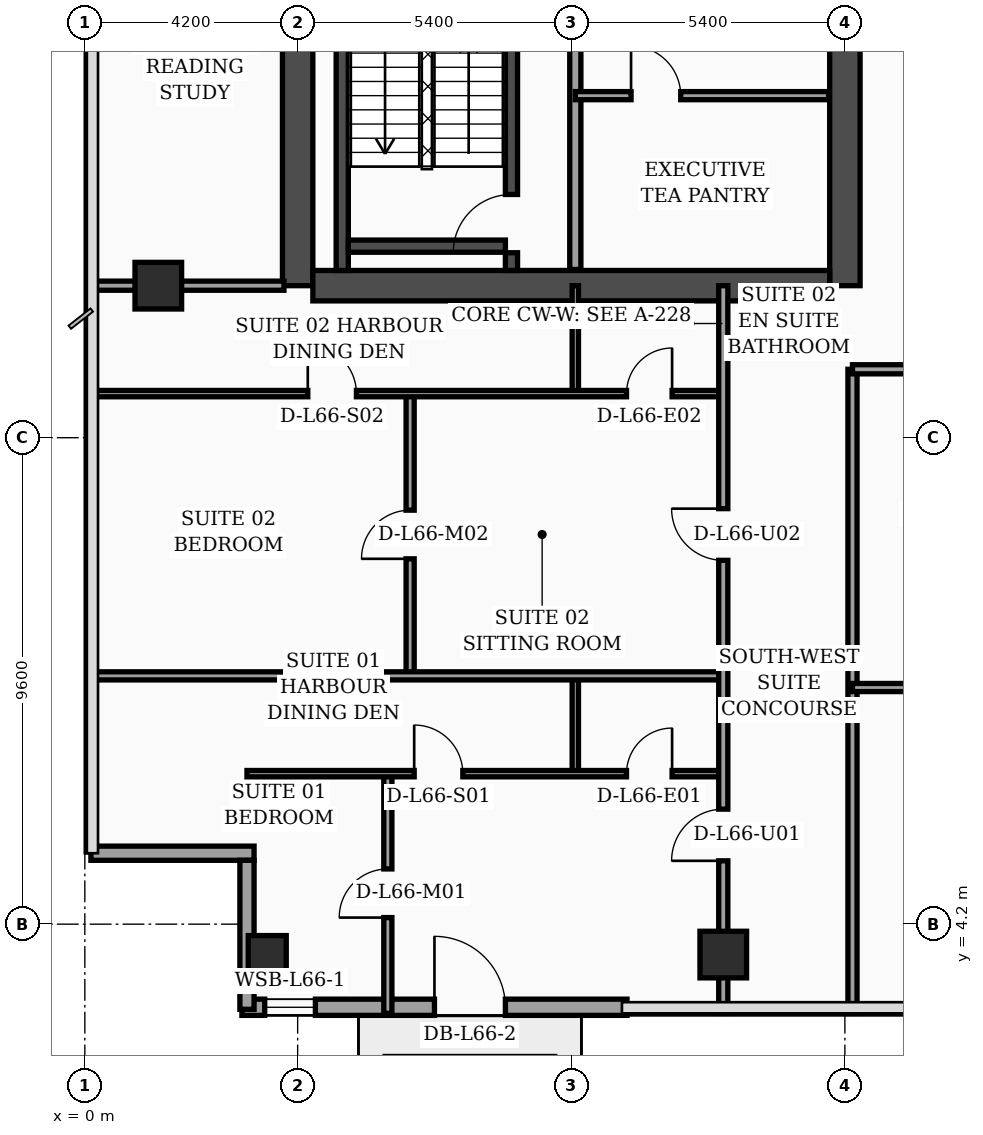
"""IFC4 building model, lengths in metres.
Left out: names, types, materials, properties, quantities, classifications, styles, units other than length and angle.
Written with IfcOpenShell. Run it as: python <this file> out.ifc"""

import sys

from ifc_helpers import new_model, si_unit, direction, frame, frame_2d, origin, origin_2d, place, context, subcontext, project, spatial, rectangle, hollow_rectangle, extrude, element, fill, save


model = new_model("IFC4")
c1 = context("Model", 3, precision=1e-05, world=origin(), true_north=direction((0.0, 1.0)))
c2 = subcontext(c1, "Body", "Model", "MODEL_VIEW")
j1 = project(units=[si_unit("LENGTHUNIT", "METRE"), si_unit("PLANEANGLEUNIT", "RADIAN")], contexts=[c1])
p1 = place(None, origin())
s1 = spatial("IfcSite", under=j1, at=p1, CompositionType="ELEMENT")
p2 = place(p1, origin())
s2 = spatial("IfcBuilding", under=s1, at=p2, CompositionType="ELEMENT")
p3 = place(p2, frame((0.0, 0.0, 267.3)))
s3 = spatial("IfcBuildingStorey", under=s2, at=p3, CompositionType="ELEMENT", Elevation=267.3)
p4 = place(p3, frame((4.2, 16.8, 0.0), z_axis=(0.0, 0.0, 1.0), x_axis=(0.0, 1.0, 0.0)))
e1 = element("IfcWall", 1, at=p4, inside=s3, PredefinedType="SHEAR", context=c2, shape_type="SweptSolid", body=[
    extrude(rectangle(XDim=21.6, YDim=0.6, at=frame_2d((10.8, 0.0))), origin(), (0.0, 0.0, 1.0), 3.56),
])
p5 = place(p3, frame((15.0, 16.8, 0.0), z_axis=(0.0, 0.0, 1.0), x_axis=(0.0, 1.0, 0.0)))
e2 = element("IfcWall", 2, at=p5, inside=s3, PredefinedType="SHEAR", context=c2, shape_type="SweptSolid", body=[
    extrude(rectangle(XDim=21.6, YDim=0.6, at=frame_2d((10.8, 0.0))), origin(), (0.0, 0.0, 1.0), 3.56),
])
p6 = place(p5, frame((8.65, 0.0, 0.0)))
e3 = element("IfcOpeningElement", 3, at=p6, cuts=e2, PredefinedType="OPENING", context=c2, shape_type="SweptSolid", body=[
    extrude(rectangle(XDim=1.1, YDim=2.2, at=frame_2d((0.55, 1.1))), frame((0.0, 0.31, 0.0), z_axis=(0.0, -1.0, 0.0), x_axis=(1.0, 0.0, 0.0)), (0.0, 0.0, 1.0), 0.62),
])
p7 = place(p5, frame((18.9, 0.0, 0.0)))
e4 = element("IfcOpeningElement", 4, at=p7, cuts=e2, PredefinedType="OPENING", context=c2, shape_type="SweptSolid", body=[
    extrude(rectangle(XDim=1.1, YDim=2.2, at=frame_2d((0.55, 1.1))), frame((0.0, 0.31, 0.0), z_axis=(0.0, -1.0, 0.0), x_axis=(1.0, 0.0, 0.0)), (0.0, 0.0, 1.0), 0.62),
])
p8 = place(p3, frame((4.5, 16.8, 0.0), z_axis=(0.0, 0.0, 1.0), x_axis=(1.0, 0.0, 0.0)))
e5 = element("IfcWall", 5, at=p8, inside=s3, PredefinedType="SHEAR", context=c2, shape_type="SweptSolid", body=[
    extrude(rectangle(XDim=10.2, YDim=0.6, at=frame_2d((5.1, 0.0))), origin(), (0.0, 0.0, 1.0), 3.56),
])
p9 = place(p3, frame((5.08, 17.1, 0.0), z_axis=(0.0, 0.0, 1.0), x_axis=(0.0, 1.0, 0.0)))
e6 = element("IfcWall", 6, at=p9, inside=s3, PredefinedType="SOLIDWALL", context=c2, shape_type="SweptSolid", body=[
    extrude(rectangle(XDim=9.69, YDim=0.24, at=frame_2d((4.845, 0.0))), origin(), (0.0, 0.0, 1.0), 3.56),
])
p10 = place(p3, frame((8.42, 17.1, 0.0), z_axis=(0.0, 0.0, 1.0), x_axis=(0.0, 1.0, 0.0)))
e7 = element("IfcWall", 7, at=p10, inside=s3, PredefinedType="SOLIDWALL", context=c2, shape_type="SweptSolid", body=[
    extrude(rectangle(XDim=9.69, YDim=0.24, at=frame_2d((4.845, 0.0))), origin(), (0.0, 0.0, 1.0), 3.56),
])
p11 = place(p10, frame((0.35, 0.0, 0.0)))
e8 = element("IfcOpeningElement", 8, at=p11, cuts=e7, PredefinedType="OPENING", context=c2, shape_type="SweptSolid", body=[
    extrude(rectangle(XDim=1.15, YDim=2.2, at=frame_2d((0.575, 1.1))), frame((0.0, 0.13, 0.0), z_axis=(0.0, -1.0, 0.0), x_axis=(1.0, 0.0, 0.0)), (0.0, 0.0, 1.0), 0.26),
])
p12 = place(p3, frame((5.2, 17.58, 0.0), z_axis=(0.0, 0.0, 1.0), x_axis=(1.0, 0.0, 0.0)))
e9 = element("IfcWall", 9, at=p12, inside=s3, PredefinedType="SOLIDWALL", context=c2, shape_type="SweptSolid", body=[
    extrude(rectangle(XDim=3.1, YDim=0.24, at=frame_2d((1.55, 0.0))), origin(), (0.0, 0.0, 1.0), 3.56),
])
p13 = place(p3, frame((3.6, 3.6, 0.0), z_axis=(0.0, 0.0, 1.0), x_axis=(1.0, 0.0, 0.0)))
e10 = element("IfcColumn", 10, at=p13, inside=s3, PredefinedType="COLUMN", context=c2, shape_type="SweptSolid", body=[
    extrude(hollow_rectangle(XDim=0.75, YDim=0.75, WallThickness=0.032, at=origin_2d()), origin(), (0.0, 0.0, 1.0), 3.56),
])
for number, where, z_axis, x_axis in (
    (11, (1.45, 16.8, 0.0), (0.0, 0.0, 1.0), (1.0, 0.0, 0.0)),
    (12, (12.6, 3.6, 0.0), (0.0, 0.0, 1.0), (1.0, 0.0, 0.0)),
):
    element("IfcColumn", number, at=place(p3, frame(where, z_axis=z_axis, x_axis=x_axis)), inside=s3, PredefinedType="COLUMN", context=c2, shape_type="SweptSolid", body=[
        extrude(rectangle(XDim=0.92, YDim=0.92, at=origin_2d()), origin(), (0.0, 0.0, 1.0), 3.56),
    ])
p14 = place(p3, frame((3.1, 2.56, 0.0), z_axis=(0.0, 0.0, 1.0), x_axis=(1.0, 0.0, 0.0)))
e13 = element("IfcWall", 13, at=p14, inside=s3, PredefinedType="SOLIDWALL", context=c2, shape_type="SweptSolid", body=[
    extrude(rectangle(XDim=7.6, YDim=0.32, at=frame_2d((3.8, 0.0))), origin(), (0.0, 0.0, 1.0), 3.56),
])
p15 = place(p14, frame((0.45, 0.0, 0.75)))
e14 = element("IfcOpeningElement", 14, at=p15, cuts=e13, PredefinedType="OPENING", context=c2, shape_type="SweptSolid", body=[
    extrude(rectangle(XDim=1.0, YDim=1.6, at=frame_2d((0.5, 0.8))), frame((0.0, 0.17, 0.0), z_axis=(0.0, -1.0, 0.0), x_axis=(1.0, 0.0, 0.0)), (0.0, 0.0, 1.0), 0.34),
])
p16 = place(p14, frame((3.8, 0.0, 0.0)))
e15 = element("IfcOpeningElement", 15, at=p16, cuts=e13, PredefinedType="OPENING", context=c2, shape_type="SweptSolid", body=[
    extrude(rectangle(XDim=1.4, YDim=2.25, at=frame_2d((0.7, 1.125))), frame((0.0, 0.17, 0.0), z_axis=(0.0, -1.0, 0.0), x_axis=(1.0, 0.0, 0.0)), (0.0, 0.0, 1.0), 0.34),
])
p17 = place(p3, frame((0.12, 5.6, 0.0), z_axis=(0.0, 0.0, 1.0), x_axis=(1.0, 0.0, 0.0)))
e16 = element("IfcWall", 16, at=p17, inside=s3, PredefinedType="SOLIDWALL", context=c2, shape_type="SweptSolid", body=[
    extrude(rectangle(XDim=3.22, YDim=0.28, at=frame_2d((1.61, 0.0))), origin(), (0.0, 0.0, 1.0), 2.99),
])
p18 = place(p3, frame((3.2, 5.46, 0.0), z_axis=(0.0, 0.0, 1.0), x_axis=(0.0, -1.0, 0.0)))
e17 = element("IfcWall", 17, at=p18, inside=s3, PredefinedType="SOLIDWALL", context=c2, shape_type="SweptSolid", body=[
    extrude(rectangle(XDim=2.94, YDim=0.28, at=frame_2d((1.47, 0.0))), origin(), (0.0, 0.0, 1.0), 2.99),
])
p19 = place(p3, frame((9.68, 17.12, 0.0), z_axis=(0.0, 0.0, 1.0), x_axis=(0.0, 1.0, 0.0)))
e18 = element("IfcWall", 18, at=p19, inside=s3, PredefinedType="SOLIDWALL", context=c2, shape_type="SweptSolid", body=[
    extrude(rectangle(XDim=7.88, YDim=0.22, at=frame_2d((3.94, 0.0))), origin(), (0.0, 0.0, 1.0), 3.56),
])
p20 = place(p3, frame((9.68, 20.55, 0.0), z_axis=(0.0, 0.0, 1.0), x_axis=(1.0, 0.0, 0.0)))
e19 = element("IfcWall", 19, at=p20, inside=s3, PredefinedType="PARTITIONING", context=c2, shape_type="SweptSolid", body=[
    extrude(rectangle(XDim=5.0, YDim=0.16, at=frame_2d((2.5, 0.0))), origin(), (0.0, 0.0, 1.0), 3.56),
])
p21 = place(p20, frame((1.1, 0.0, 0.0)))
e20 = element("IfcOpeningElement", 20, at=p21, cuts=e19, PredefinedType="OPENING", context=c2, shape_type="SweptSolid", body=[
    extrude(rectangle(XDim=0.98, YDim=2.15, at=frame_2d((0.49, 1.075))), frame((0.0, 0.09, 0.0), z_axis=(0.0, -1.0, 0.0), x_axis=(1.0, 0.0, 0.0)), (0.0, 0.0, 1.0), 0.18),
])
p22 = place(p3, frame((0.08, 16.8, 0.0), z_axis=(0.0, 0.0, 1.0), x_axis=(1.0, 0.0, 0.0)))
e21 = element("IfcWall", 21, at=p22, inside=s3, PredefinedType="PARTITIONING", context=c2, shape_type="SweptSolid", body=[
    extrude(rectangle(XDim=3.85, YDim=0.18, at=frame_2d((1.925, 0.0))), origin(), (0.0, 0.0, 1.0), 2.99),
])
p23 = place(p3, frame((9.68, 7.17, 0.0), z_axis=(0.0, 0.0, 1.0), x_axis=(0.0, 1.0, 0.0)))
e22 = element("IfcWall", 22, at=p23, inside=s3, PredefinedType="PARTITIONING", context=c2, shape_type="SweptSolid", body=[
    extrude(rectangle(XDim=1.93, YDim=0.125, at=frame_2d((0.965, 0.0))), origin(), (0.0, 0.0, 1.0), 3.09),
])
p24 = place(p3, frame((5.98, 2.44, 0.0), z_axis=(0.0, 0.0, 1.0), x_axis=(0.0, 1.0, 0.0)))
e23 = element("IfcWall", 23, at=p24, inside=s3, PredefinedType="PARTITIONING", context=c2, shape_type="SweptSolid", body=[
    extrude(rectangle(XDim=4.73, YDim=0.16, at=frame_2d((2.365, 0.0))), origin(), (0.0, 0.0, 1.0), 3.09),
])
p25 = place(p24, frame((1.89, 0.0, 0.0)))
e24 = element("IfcOpeningElement", 24, at=p25, cuts=e23, PredefinedType="OPENING", context=c2, shape_type="SweptSolid", body=[
    extrude(rectangle(XDim=0.96, YDim=2.2, at=frame_2d((0.48, 1.1))), frame((0.0, 0.09, 0.0), z_axis=(0.0, -1.0, 0.0), x_axis=(1.0, 0.0, 0.0)), (0.0, 0.0, 1.0), 0.18),
])
p26 = place(p3, frame((3.2, 7.17, 0.0), z_axis=(0.0, 0.0, 1.0), x_axis=(1.0, 0.0, 0.0)))
e25 = element("IfcWall", 25, at=p26, inside=s3, PredefinedType="PARTITIONING", context=c2, shape_type="SweptSolid", body=[
    extrude(rectangle(XDim=9.4, YDim=0.125, at=frame_2d((4.7, 0.0))), origin(), (0.0, 0.0, 1.0), 2.99),
])
p27 = place(p26, frame((3.3, 0.0, 0.0)))
e26 = element("IfcOpeningElement", 26, at=p27, cuts=e25, PredefinedType="OPENING", context=c2, shape_type="SweptSolid", body=[
    extrude(rectangle(XDim=0.96, YDim=2.2, at=frame_2d((0.48, 1.1))), frame((0.0, 0.073, 0.0), z_axis=(0.0, -1.0, 0.0), x_axis=(1.0, 0.0, 0.0)), (0.0, 0.0, 1.0), 0.145),
])
p28 = place(p26, frame((7.49, 0.0, 0.0)))
e27 = element("IfcOpeningElement", 27, at=p28, cuts=e25, PredefinedType="OPENING", context=c2, shape_type="SweptSolid", body=[
    extrude(rectangle(XDim=0.9, YDim=2.15, at=frame_2d((0.45, 1.075))), frame((0.0, 0.073, 0.0), z_axis=(0.0, -1.0, 0.0), x_axis=(1.0, 0.0, 0.0)), (0.0, 0.0, 1.0), 0.145),
])
p29 = place(p3, frame((9.68, 14.67, 0.0), z_axis=(0.0, 0.0, 1.0), x_axis=(0.0, 1.0, 0.0)))
e28 = element("IfcWall", 28, at=p29, inside=s3, PredefinedType="PARTITIONING", context=c2, shape_type="SweptSolid", body=[
    extrude(rectangle(XDim=2.13, YDim=0.125, at=frame_2d((1.065, 0.0))), origin(), (0.0, 0.0, 1.0), 3.56),
])
p30 = place(p3, frame((6.42, 9.1, 0.0), z_axis=(0.0, 0.0, 1.0), x_axis=(0.0, 1.0, 0.0)))
e29 = element("IfcWall", 29, at=p30, inside=s3, PredefinedType="PARTITIONING", context=c2, shape_type="SweptSolid", body=[
    extrude(rectangle(XDim=5.57, YDim=0.16, at=frame_2d((2.785, 0.0))), origin(), (0.0, 0.0, 1.0), 3.14),
])
p31 = place(p30, frame((2.31, 0.0, 0.0)))
e30 = element("IfcOpeningElement", 30, at=p31, cuts=e29, PredefinedType="OPENING", context=c2, shape_type="SweptSolid", body=[
    extrude(rectangle(XDim=0.96, YDim=2.2, at=frame_2d((0.48, 1.1))), frame((0.0, 0.09, 0.0), z_axis=(0.0, -1.0, 0.0), x_axis=(1.0, 0.0, 0.0)), (0.0, 0.0, 1.0), 0.18),
])
p32 = place(p3, frame((0.08, 14.67, 0.0), z_axis=(0.0, 0.0, 1.0), x_axis=(1.0, 0.0, 0.0)))
e31 = element("IfcWall", 31, at=p32, inside=s3, PredefinedType="PARTITIONING", context=c2, shape_type="SweptSolid", body=[
    extrude(rectangle(XDim=12.52, YDim=0.125, at=frame_2d((6.26, 0.0))), origin(), (0.0, 0.0, 1.0), 2.99),
])
p33 = place(p32, frame((4.32, 0.0, 0.0)))
e32 = element("IfcOpeningElement", 32, at=p33, cuts=e31, PredefinedType="OPENING", context=c2, shape_type="SweptSolid", body=[
    extrude(rectangle(XDim=0.96, YDim=2.2, at=frame_2d((0.48, 1.1))), frame((0.0, 0.073, 0.0), z_axis=(0.0, -1.0, 0.0), x_axis=(1.0, 0.0, 0.0)), (0.0, 0.0, 1.0), 0.145),
])
p34 = place(p32, frame((10.61, 0.0, 0.0)))
e33 = element("IfcOpeningElement", 33, at=p34, cuts=e31, PredefinedType="OPENING", context=c2, shape_type="SweptSolid", body=[
    extrude(rectangle(XDim=0.9, YDim=2.15, at=frame_2d((0.45, 1.075))), frame((0.0, 0.073, 0.0), z_axis=(0.0, -1.0, 0.0), x_axis=(1.0, 0.0, 0.0)), (0.0, 0.0, 1.0), 0.145),
])
p35 = place(p3, frame((0.08, 9.1, 0.0), z_axis=(0.0, 0.0, 1.0), x_axis=(1.0, 0.0, 0.0)))
e34 = element("IfcWall", 34, at=p35, inside=s3, PredefinedType="PARTITIONING", context=c2, shape_type="SweptSolid", body=[
    extrude(rectangle(XDim=12.52, YDim=0.16, at=frame_2d((6.26, 0.0))), origin(), (0.0, 0.0, 1.0), 2.99),
])
p36 = place(p3, frame((12.6, 2.44, 0.0), z_axis=(0.0, 0.0, 1.0), x_axis=(0.0, 1.0, 0.0)))
e35 = element("IfcWall", 35, at=p36, inside=s3, PredefinedType="PARTITIONING", context=c2, shape_type="SweptSolid", body=[
    extrude(rectangle(XDim=14.36, YDim=0.18, at=frame_2d((7.18, 0.0))), origin(), (0.0, 0.0, 1.0), 2.99),
])
p37 = place(p36, frame((3.01, 0.0, 0.0)))
e36 = element("IfcOpeningElement", 36, at=p37, cuts=e35, PredefinedType="OPENING", context=c2, shape_type="SweptSolid", body=[
    extrude(rectangle(XDim=1.02, YDim=2.2, at=frame_2d((0.51, 1.1))), frame((0.0, 0.1, 0.0), z_axis=(0.0, -1.0, 0.0), x_axis=(1.0, 0.0, 0.0)), (0.0, 0.0, 1.0), 0.2),
])
p38 = place(p36, frame((8.94, 0.0, 0.0)))
e37 = element("IfcOpeningElement", 37, at=p38, cuts=e35, PredefinedType="OPENING", context=c2, shape_type="SweptSolid", body=[
    extrude(rectangle(XDim=1.02, YDim=2.2, at=frame_2d((0.51, 1.1))), frame((0.0, 0.1, 0.0), z_axis=(0.0, -1.0, 0.0), x_axis=(1.0, 0.0, 0.0)), (0.0, 0.0, 1.0), 0.2),
])
p39 = place(p3, frame((15.15, 2.44, 0.0), z_axis=(0.0, 0.0, 1.0), x_axis=(0.0, 1.0, 0.0)))
e38 = element("IfcWall", 38, at=p39, inside=s3, PredefinedType="PARTITIONING", context=c2, shape_type="SweptSolid", body=[
    extrude(rectangle(XDim=12.71, YDim=0.18, at=frame_2d((6.355, 0.0))), origin(), (0.0, 0.0, 1.0), 3.09),
])
p40 = place(p3, frame((15.15, 8.87, 0.0), z_axis=(0.0, 0.0, 1.0), x_axis=(1.0, 0.0, 0.0)))
e39 = element("IfcWall", 39, at=p40, inside=s3, PredefinedType="PARTITIONING", context=c2, shape_type="SweptSolid", body=[
    extrude(rectangle(XDim=4.45, YDim=0.16, at=frame_2d((2.225, 0.0))), origin(), (0.0, 0.0, 1.0), 3.56),
])
p41 = place(p40, frame((1.75, 0.0, 0.0)))
e40 = element("IfcOpeningElement", 40, at=p41, cuts=e39, PredefinedType="OPENING", context=c2, shape_type="SweptSolid", body=[
    extrude(rectangle(XDim=0.96, YDim=2.2, at=frame_2d((0.48, 1.1))), frame((0.0, 0.09, 0.0), z_axis=(0.0, -1.0, 0.0), x_axis=(1.0, 0.0, 0.0)), (0.0, 0.0, 1.0), 0.18),
])
p42 = place(p3, frame((15.15, 15.15, 0.0), z_axis=(0.0, 0.0, 1.0), x_axis=(1.0, 0.0, 0.0)))
e41 = element("IfcWall", 41, at=p42, inside=s3, PredefinedType="PARTITIONING", context=c2, shape_type="SweptSolid", body=[
    extrude(rectangle(XDim=6.45, YDim=0.18, at=frame_2d((3.225, 0.0))), origin(), (0.0, 0.0, 1.0), 2.59),
])
p43 = place(p42, frame((1.74, 0.0, 0.0)))
e42 = element("IfcOpeningElement", 42, at=p43, cuts=e41, PredefinedType="OPENING", context=c2, shape_type="SweptSolid", body=[
    extrude(rectangle(XDim=1.02, YDim=2.2, at=frame_2d((0.51, 1.1))), frame((0.0, 0.1, 0.0), z_axis=(0.0, -1.0, 0.0), x_axis=(1.0, 0.0, 0.0)), (0.0, 0.0, 1.0), 0.2),
])
p44 = place(p15, origin())
e43 = element("IfcWindow", 43, at=p44, inside=s3, PartitioningType="SINGLE_PANEL", PredefinedType="WINDOW", context=c2, shape_type="SweptSolid", body=[
    extrude(rectangle(XDim=1.0, YDim=1.6, at=frame_2d((0.5, 0.8))), frame((0.0, 0.03, 0.0), z_axis=(0.0, -1.0, 0.0), x_axis=(1.0, 0.0, 0.0)), (0.0, 0.0, 1.0), 0.06),
])
fill(e14, e43)
p45 = place(p16, origin())
e44 = element("IfcDoor", 44, at=p45, inside=s3, OperationType="SINGLE_SWING_LEFT", PredefinedType="DOOR", context=c2, shape_type="SweptSolid", body=[
    extrude(rectangle(XDim=1.4, YDim=2.25, at=frame_2d((0.7, 1.125))), frame((0.0, 0.025, 0.0), z_axis=(0.0, -1.0, 0.0), x_axis=(1.0, 0.0, 0.0)), (0.0, 0.0, 1.0), 0.05),
])
fill(e15, e44)
p46 = place(p21, origin())
e45 = element("IfcDoor", 45, at=p46, inside=s3, OperationType="SINGLE_SWING_LEFT", PredefinedType="DOOR", context=c2, shape_type="SweptSolid", body=[
    extrude(rectangle(XDim=0.98, YDim=2.15, at=frame_2d((0.49, 1.075))), frame((0.0, 0.025, 0.0), z_axis=(0.0, -1.0, 0.0), x_axis=(1.0, 0.0, 0.0)), (0.0, 0.0, 1.0), 0.05),
])
fill(e20, e45)
p47 = place(p25, origin())
e46 = element("IfcDoor", 46, at=p47, inside=s3, OperationType="SINGLE_SWING_LEFT", PredefinedType="DOOR", context=c2, shape_type="SweptSolid", body=[
    extrude(rectangle(XDim=0.96, YDim=2.2, at=frame_2d((0.48, 1.1))), frame((0.0, 0.025, 0.0), z_axis=(0.0, -1.0, 0.0), x_axis=(1.0, 0.0, 0.0)), (0.0, 0.0, 1.0), 0.05),
])
fill(e24, e46)
p48 = place(p27, origin())
e47 = element("IfcDoor", 47, at=p48, inside=s3, OperationType="SINGLE_SWING_LEFT", PredefinedType="DOOR", context=c2, shape_type="SweptSolid", body=[
    extrude(rectangle(XDim=0.96, YDim=2.2, at=frame_2d((0.48, 1.1))), frame((0.0, 0.025, 0.0), z_axis=(0.0, -1.0, 0.0), x_axis=(1.0, 0.0, 0.0)), (0.0, 0.0, 1.0), 0.05),
])
fill(e26, e47)
p49 = place(p28, origin())
e48 = element("IfcDoor", 48, at=p49, inside=s3, OperationType="SINGLE_SWING_RIGHT", PredefinedType="DOOR", context=c2, shape_type="SweptSolid", body=[
    extrude(rectangle(XDim=0.9, YDim=2.15, at=frame_2d((0.45, 1.075))), frame((0.0, 0.025, 0.0), z_axis=(0.0, -1.0, 0.0), x_axis=(1.0, 0.0, 0.0)), (0.0, 0.0, 1.0), 0.05),
])
fill(e27, e48)
p50 = place(p31, origin())
e49 = element("IfcDoor", 49, at=p50, inside=s3, OperationType="SINGLE_SWING_LEFT", PredefinedType="DOOR", context=c2, shape_type="SweptSolid", body=[
    extrude(rectangle(XDim=0.96, YDim=2.2, at=frame_2d((0.48, 1.1))), frame((0.0, 0.025, 0.0), z_axis=(0.0, -1.0, 0.0), x_axis=(1.0, 0.0, 0.0)), (0.0, 0.0, 1.0), 0.05),
])
fill(e30, e49)
p51 = place(p33, origin())
e50 = element("IfcDoor", 50, at=p51, inside=s3, OperationType="SINGLE_SWING_LEFT", PredefinedType="DOOR", context=c2, shape_type="SweptSolid", body=[
    extrude(rectangle(XDim=0.96, YDim=2.2, at=frame_2d((0.48, 1.1))), frame((0.0, 0.025, 0.0), z_axis=(0.0, -1.0, 0.0), x_axis=(1.0, 0.0, 0.0)), (0.0, 0.0, 1.0), 0.05),
])
fill(e32, e50)
p52 = place(p34, origin())
e51 = element("IfcDoor", 51, at=p52, inside=s3, OperationType="SINGLE_SWING_RIGHT", PredefinedType="DOOR", context=c2, shape_type="SweptSolid", body=[
    extrude(rectangle(XDim=0.9, YDim=2.15, at=frame_2d((0.45, 1.075))), frame((0.0, 0.025, 0.0), z_axis=(0.0, -1.0, 0.0), x_axis=(1.0, 0.0, 0.0)), (0.0, 0.0, 1.0), 0.05),
])
fill(e33, e51)
p53 = place(p37, origin())
e52 = element("IfcDoor", 52, at=p53, inside=s3, OperationType="SINGLE_SWING_LEFT", PredefinedType="DOOR", context=c2, shape_type="SweptSolid", body=[
    extrude(rectangle(XDim=1.02, YDim=2.2, at=frame_2d((0.51, 1.1))), frame((0.0, 0.025, 0.0), z_axis=(0.0, -1.0, 0.0), x_axis=(1.0, 0.0, 0.0)), (0.0, 0.0, 1.0), 0.05),
])
fill(e36, e52)
p54 = place(p38, origin())
e53 = element("IfcDoor", 53, at=p54, inside=s3, OperationType="SINGLE_SWING_RIGHT", PredefinedType="DOOR", context=c2, shape_type="SweptSolid", body=[
    extrude(rectangle(XDim=1.02, YDim=2.2, at=frame_2d((0.51, 1.1))), frame((0.0, 0.025, 0.0), z_axis=(0.0, -1.0, 0.0), x_axis=(1.0, 0.0, 0.0)), (0.0, 0.0, 1.0), 0.05),
])
fill(e37, e53)
p55 = place(p11, origin())
e54 = element("IfcDoor", 54, at=p55, inside=s3, OperationType="SINGLE_SWING_LEFT", PredefinedType="DOOR", context=c2, shape_type="SweptSolid", body=[
    extrude(rectangle(XDim=1.15, YDim=2.2, at=frame_2d((0.575, 1.1))), frame((0.0, 0.025, 0.0), z_axis=(0.0, -1.0, 0.0), x_axis=(1.0, 0.0, 0.0)), (0.0, 0.0, 1.0), 0.05),
])
fill(e8, e54)
save(model, sys.argv[1])
